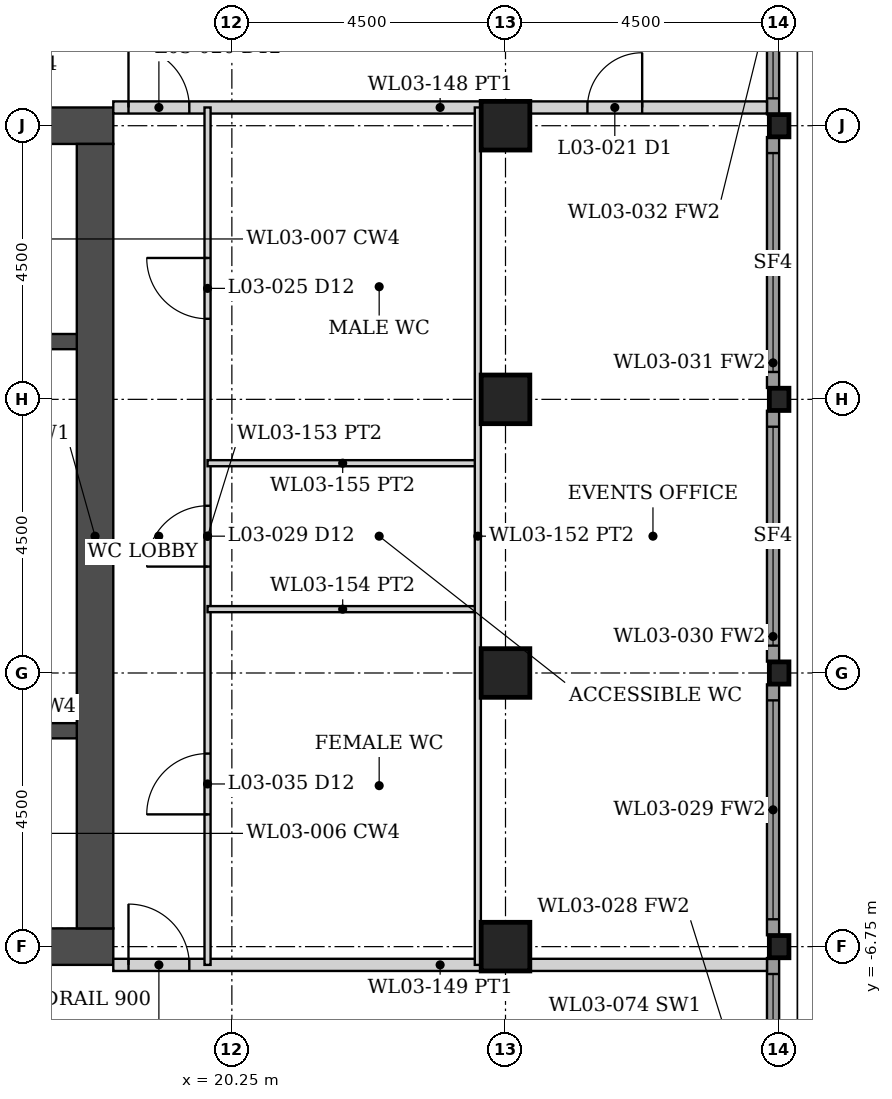
"""IFC4 building model, lengths in metres.
Left out: names, types, materials, properties, quantities, classifications, styles, units other than length and angle.
Written with IfcOpenShell. Run it as: python <this file> out.ifc"""

import sys

from ifc_helpers import new_model, si_unit, direction, frame, frame_2d, origin, origin_2d, place, context, subcontext, project, spatial, rectangle, hollow_rectangle, i_section, extrude, element, fill, save


model = new_model("IFC4")
c1 = context("Model", 3, precision=1e-05, world=origin(), true_north=direction((0.0, 1.0)))
c2 = subcontext(c1, "Body", "Model", "MODEL_VIEW")
j1 = project(units=[si_unit("LENGTHUNIT", "METRE"), si_unit("PLANEANGLEUNIT", "RADIAN")], contexts=[c1])
p1 = place(None, origin())
s1 = spatial("IfcSite", under=j1, at=p1, CompositionType="ELEMENT")
p2 = place(p1, origin())
s2 = spatial("IfcBuilding", under=s1, at=p2, CompositionType="ELEMENT")
p3 = place(p2, frame((0.0, 0.0, 16.0)))
s3 = spatial("IfcBuildingStorey", under=s2, at=p3, CompositionType="ELEMENT", Elevation=16.0)
for number, where, z_axis, x_axis in (
    (1, (24.75, -6.75, 0.0), (0.0, 0.0, 1.0), (1.0, 0.0, 0.0)),
    (2, (24.75, -2.25, 0.0), (0.0, 0.0, 1.0), (1.0, 0.0, 0.0)),
    (3, (24.75, 2.25, 0.0), (0.0, 0.0, 1.0), (1.0, 0.0, 0.0)),
    (4, (24.75, 6.75, 0.0), (0.0, 0.0, 1.0), (1.0, 0.0, 0.0)),
):
    element("IfcColumn", number, at=place(p3, frame(where, z_axis=z_axis, x_axis=x_axis)), inside=s3, PredefinedType="COLUMN", context=c2, shape_type="SweptSolid", body=[
        extrude(hollow_rectangle(XDim=0.8, YDim=0.8, WallThickness=0.08, at=origin_2d()), origin(), (0.0, 0.0, 1.0), 5.5),
    ])
for number, where, z_axis, x_axis in (
    (5, (29.25, -6.75, 0.0), (0.0, 0.0, 1.0), (1.0, 0.0, 0.0)),
    (6, (29.25, -2.25, 0.0), (0.0, 0.0, 1.0), (1.0, 0.0, 0.0)),
    (7, (29.25, 2.25, 0.0), (0.0, 0.0, 1.0), (1.0, 0.0, 0.0)),
    (8, (29.25, 6.75, 0.0), (0.0, 0.0, 1.0), (1.0, 0.0, 0.0)),
):
    element("IfcColumn", number, at=place(p3, frame(where, z_axis=z_axis, x_axis=x_axis)), inside=s3, PredefinedType="COLUMN", context=c2, shape_type="SweptSolid", body=[
        extrude(i_section(OverallWidth=0.322, OverallDepth=0.365, WebThickness=0.027, FlangeThickness=0.044, FilletRadius=0.015, at=origin_2d()), origin(), (0.0, 0.0, 1.0), 5.5),
    ])
for number, where, z_axis, x_axis in (
    (9, (8.7, -6.75, 0.0), (0.0, 0.0, 1.0), (1.0, 0.0, 0.0)),
    (10, (8.7, 6.75, 0.0), (0.0, 0.0, 1.0), (1.0, 0.0, 0.0)),
):
    element("IfcWall", number, at=place(p3, frame(where, z_axis=z_axis, x_axis=x_axis)), inside=s3, PredefinedType="SHEAR", context=c2, shape_type="SweptSolid", body=[
        extrude(rectangle(XDim=9.6, YDim=0.6, at=frame_2d((4.8, 0.0))), origin(), (0.0, 0.0, 1.0), 5.5),
    ])
p4 = place(p3, frame((18.0, -6.45, 0.0), z_axis=(0.0, 0.0, 1.0), x_axis=(0.0, 1.0, 0.0)))
e11 = element("IfcWall", 11, at=p4, inside=s3, PredefinedType="SHEAR", context=c2, shape_type="SweptSolid", body=[
    extrude(rectangle(XDim=12.9, YDim=0.6, at=frame_2d((6.45, 0.0))), origin(), (0.0, 0.0, 1.0), 5.5),
])
p5 = place(p3, frame((9.3, -3.2, 0.0), z_axis=(0.0, 0.0, 1.0), x_axis=(1.0, 0.0, 0.0)))
e12 = element("IfcWall", 12, at=p5, inside=s3, PredefinedType="SHEAR", context=c2, shape_type="SweptSolid", body=[
    extrude(rectangle(XDim=8.4, YDim=0.25, at=frame_2d((4.2, 0.0))), origin(), (0.0, 0.0, 1.0), 5.5),
])
p6 = place(p5, frame((0.15, 0.0, 0.0)))
e13 = element("IfcOpeningElement", 13, at=p6, cuts=e12, PredefinedType="OPENING", context=c2, shape_type="SweptSolid", body=[
    extrude(rectangle(XDim=1.0, YDim=2.1, at=frame_2d((0.5, 1.05))), frame((0.0, 0.135, 0.0), z_axis=(0.0, -1.0, 0.0), x_axis=(1.0, 0.0, 0.0)), (0.0, 0.0, 1.0), 0.27),
])
p7 = place(p3, frame((9.3, 3.2, 0.0), z_axis=(0.0, 0.0, 1.0), x_axis=(1.0, 0.0, 0.0)))
e14 = element("IfcWall", 14, at=p7, inside=s3, PredefinedType="SHEAR", context=c2, shape_type="SweptSolid", body=[
    extrude(rectangle(XDim=8.4, YDim=0.25, at=frame_2d((4.2, 0.0))), origin(), (0.0, 0.0, 1.0), 5.5),
])
p8 = place(p3, frame((29.15, -11.062, 0.0), z_axis=(0.0, 0.0, 1.0), x_axis=(0.0, 1.0, 0.0)))
e15 = element("IfcWall", 15, at=p8, inside=s3, PredefinedType="SOLIDWALL", context=c2, shape_type="SweptSolid", body=[
    extrude(rectangle(XDim=4.125, YDim=0.2, at=frame_2d((2.062, 0.0))), origin(), (0.0, 0.0, 1.0), 4.633),
])
p9 = place(p8, frame((0.262, 0.0, 0.15)))
e16 = element("IfcOpeningElement", 16, at=p9, cuts=e15, PredefinedType="OPENING", context=c2, shape_type="SweptSolid", body=[
    extrude(rectangle(XDim=3.6, YDim=4.333, at=frame_2d((1.8, 2.167))), frame((0.0, 0.11, 0.0), z_axis=(0.0, -1.0, 0.0), x_axis=(1.0, 0.0, 0.0)), (0.0, 0.0, 1.0), 0.22),
])
p10 = place(p3, frame((29.15, -6.562, 0.0), z_axis=(0.0, 0.0, 1.0), x_axis=(0.0, 1.0, 0.0)))
e17 = element("IfcWall", 17, at=p10, inside=s3, PredefinedType="SOLIDWALL", context=c2, shape_type="SweptSolid", body=[
    extrude(rectangle(XDim=4.125, YDim=0.2, at=frame_2d((2.062, 0.0))), origin(), (0.0, 0.0, 1.0), 4.633),
])
p11 = place(p10, frame((0.262, 0.0, 0.15)))
e18 = element("IfcOpeningElement", 18, at=p11, cuts=e17, PredefinedType="OPENING", context=c2, shape_type="SweptSolid", body=[
    extrude(rectangle(XDim=3.6, YDim=4.333, at=frame_2d((1.8, 2.167))), frame((0.0, 0.11, 0.0), z_axis=(0.0, -1.0, 0.0), x_axis=(1.0, 0.0, 0.0)), (0.0, 0.0, 1.0), 0.22),
])
p12 = place(p3, frame((29.15, -2.062, 0.0), z_axis=(0.0, 0.0, 1.0), x_axis=(0.0, 1.0, 0.0)))
e19 = element("IfcWall", 19, at=p12, inside=s3, PredefinedType="SOLIDWALL", context=c2, shape_type="SweptSolid", body=[
    extrude(rectangle(XDim=4.125, YDim=0.2, at=frame_2d((2.062, 0.0))), origin(), (0.0, 0.0, 1.0), 4.633),
])
p13 = place(p12, frame((0.262, 0.0, 0.15)))
e20 = element("IfcOpeningElement", 20, at=p13, cuts=e19, PredefinedType="OPENING", context=c2, shape_type="SweptSolid", body=[
    extrude(rectangle(XDim=3.6, YDim=4.333, at=frame_2d((1.8, 2.167))), frame((0.0, 0.11, 0.0), z_axis=(0.0, -1.0, 0.0), x_axis=(1.0, 0.0, 0.0)), (0.0, 0.0, 1.0), 0.22),
])
p14 = place(p3, frame((29.15, 2.438, 0.0), z_axis=(0.0, 0.0, 1.0), x_axis=(0.0, 1.0, 0.0)))
e21 = element("IfcWall", 21, at=p14, inside=s3, PredefinedType="SOLIDWALL", context=c2, shape_type="SweptSolid", body=[
    extrude(rectangle(XDim=4.125, YDim=0.2, at=frame_2d((2.062, 0.0))), origin(), (0.0, 0.0, 1.0), 4.633),
])
p15 = place(p14, frame((0.262, 0.0, 0.15)))
e22 = element("IfcOpeningElement", 22, at=p15, cuts=e21, PredefinedType="OPENING", context=c2, shape_type="SweptSolid", body=[
    extrude(rectangle(XDim=3.6, YDim=4.333, at=frame_2d((1.8, 2.167))), frame((0.0, 0.11, 0.0), z_axis=(0.0, -1.0, 0.0), x_axis=(1.0, 0.0, 0.0)), (0.0, 0.0, 1.0), 0.22),
])
p16 = place(p3, frame((29.15, 6.938, 0.0), z_axis=(0.0, 0.0, 1.0), x_axis=(0.0, 1.0, 0.0)))
e23 = element("IfcWall", 23, at=p16, inside=s3, PredefinedType="SOLIDWALL", context=c2, shape_type="SweptSolid", body=[
    extrude(rectangle(XDim=4.125, YDim=0.2, at=frame_2d((2.062, 0.0))), origin(), (0.0, 0.0, 1.0), 4.633),
])
p17 = place(p16, frame((0.262, 0.0, 0.15)))
e24 = element("IfcOpeningElement", 24, at=p17, cuts=e23, PredefinedType="OPENING", context=c2, shape_type="SweptSolid", body=[
    extrude(rectangle(XDim=3.6, YDim=4.333, at=frame_2d((1.8, 2.167))), frame((0.0, 0.11, 0.0), z_axis=(0.0, -1.0, 0.0), x_axis=(1.0, 0.0, 0.0)), (0.0, 0.0, 1.0), 0.22),
])
p18 = place(p3, frame((18.3, 7.05, 0.0), z_axis=(0.0, 0.0, 1.0), x_axis=(1.0, 0.0, 0.0)))
e25 = element("IfcWall", 25, at=p18, inside=s3, PredefinedType="PARTITIONING", context=c2, shape_type="SweptSolid", body=[
    extrude(rectangle(XDim=10.75, YDim=0.2, at=frame_2d((5.375, 0.0))), origin(), (0.0, 0.0, 1.0), 4.329),
])
p19 = place(p18, frame((7.798, 0.0, 0.0)))
e26 = element("IfcOpeningElement", 26, at=p19, cuts=e25, PredefinedType="OPENING", context=c2, shape_type="SweptSolid", body=[
    extrude(rectangle(XDim=0.9, YDim=2.1, at=frame_2d((0.45, 1.05))), frame((0.0, 0.11, 0.0), z_axis=(0.0, -1.0, 0.0), x_axis=(1.0, 0.0, 0.0)), (0.0, 0.0, 1.0), 0.22),
])
p20 = place(p18, frame((0.25, 0.0, 0.0)))
e27 = element("IfcOpeningElement", 27, at=p20, cuts=e25, PredefinedType="OPENING", context=c2, shape_type="SweptSolid", body=[
    extrude(rectangle(XDim=1.0, YDim=2.1, at=frame_2d((0.5, 1.05))), frame((0.0, 0.11, 0.0), z_axis=(0.0, -1.0, 0.0), x_axis=(1.0, 0.0, 0.0)), (0.0, 0.0, 1.0), 0.22),
])
p21 = place(p3, frame((18.3, -7.05, 0.0), z_axis=(0.0, 0.0, 1.0), x_axis=(1.0, 0.0, 0.0)))
e28 = element("IfcWall", 28, at=p21, inside=s3, PredefinedType="PARTITIONING", context=c2, shape_type="SweptSolid", body=[
    extrude(rectangle(XDim=10.75, YDim=0.2, at=frame_2d((5.375, 0.0))), origin(), (0.0, 0.0, 1.0), 4.329),
])
p22 = place(p21, frame((0.25, 0.0, 0.0)))
e29 = element("IfcOpeningElement", 29, at=p22, cuts=e28, PredefinedType="OPENING", context=c2, shape_type="SweptSolid", body=[
    extrude(rectangle(XDim=1.0, YDim=2.1, at=frame_2d((0.5, 1.05))), frame((0.0, 0.11, 0.0), z_axis=(0.0, -1.0, 0.0), x_axis=(1.0, 0.0, 0.0)), (0.0, 0.0, 1.0), 0.22),
])
p23 = place(p3, frame((19.85, -7.05, 0.0), z_axis=(0.0, 0.0, 1.0), x_axis=(0.0, 1.0, 0.0)))
e30 = element("IfcWall", 30, at=p23, inside=s3, PredefinedType="PARTITIONING", context=c2, shape_type="SweptSolid", body=[
    extrude(rectangle(XDim=14.1, YDim=0.1, at=frame_2d((7.05, 0.0))), origin(), (0.0, 0.0, 1.0), 4.329),
])
p24 = place(p23, frame((2.475, 0.0, 0.0)))
e31 = element("IfcOpeningElement", 31, at=p24, cuts=e30, PredefinedType="OPENING", context=c2, shape_type="SweptSolid", body=[
    extrude(rectangle(XDim=1.0, YDim=2.1, at=frame_2d((0.5, 1.05))), frame((0.0, 0.06, 0.0), z_axis=(0.0, -1.0, 0.0), x_axis=(1.0, 0.0, 0.0)), (0.0, 0.0, 1.0), 0.12),
])
p25 = place(p23, frame((6.55, 0.0, 0.0)))
e32 = element("IfcOpeningElement", 32, at=p25, cuts=e30, PredefinedType="OPENING", context=c2, shape_type="SweptSolid", body=[
    extrude(rectangle(XDim=1.0, YDim=2.1, at=frame_2d((0.5, 1.05))), frame((0.0, 0.06, 0.0), z_axis=(0.0, -1.0, 0.0), x_axis=(1.0, 0.0, 0.0)), (0.0, 0.0, 1.0), 0.12),
])
p26 = place(p23, frame((10.625, 0.0, 0.0)))
e33 = element("IfcOpeningElement", 33, at=p26, cuts=e30, PredefinedType="OPENING", context=c2, shape_type="SweptSolid", body=[
    extrude(rectangle(XDim=1.0, YDim=2.1, at=frame_2d((0.5, 1.05))), frame((0.0, 0.06, 0.0), z_axis=(0.0, -1.0, 0.0), x_axis=(1.0, 0.0, 0.0)), (0.0, 0.0, 1.0), 0.12),
])
for number, where, z_axis, x_axis in (
    (34, (19.85, -1.2, 0.0), (0.0, 0.0, 1.0), (1.0, 0.0, 0.0)),
    (35, (19.85, 1.2, 0.0), (0.0, 0.0, 1.0), (1.0, 0.0, 0.0)),
):
    element("IfcWall", number, at=place(p3, frame(where, z_axis=z_axis, x_axis=x_axis)), inside=s3, PredefinedType="PARTITIONING", context=c2, shape_type="SweptSolid", body=[
        extrude(rectangle(XDim=4.445, YDim=0.1, at=frame_2d((2.222, 0.0))), origin(), (0.0, 0.0, 1.0), 4.329),
    ])
p27 = place(p3, frame((24.295, -7.05, 0.0), z_axis=(0.0, 0.0, 1.0), x_axis=(0.0, 1.0, 0.0)))
e36 = element("IfcWall", 36, at=p27, inside=s3, PredefinedType="PARTITIONING", context=c2, shape_type="SweptSolid", body=[
    extrude(rectangle(XDim=14.1, YDim=0.1, at=frame_2d((7.05, 0.0))), origin(), (0.0, 0.0, 1.0), 4.329),
])
p28 = place(p9, origin())
e37 = element("IfcWindow", 37, at=p28, inside=s3, PartitioningType="SINGLE_PANEL", PredefinedType="WINDOW", context=c2, shape_type="SweptSolid", body=[
    extrude(rectangle(XDim=3.6, YDim=4.333, at=frame_2d((1.8, 2.167))), frame((0.0, 0.03, 0.0), z_axis=(0.0, -1.0, 0.0), x_axis=(1.0, 0.0, 0.0)), (0.0, 0.0, 1.0), 0.06),
])
fill(e16, e37)
p29 = place(p11, origin())
e38 = element("IfcWindow", 38, at=p29, inside=s3, PartitioningType="SINGLE_PANEL", PredefinedType="WINDOW", context=c2, shape_type="SweptSolid", body=[
    extrude(rectangle(XDim=3.6, YDim=4.333, at=frame_2d((1.8, 2.167))), frame((0.0, 0.03, 0.0), z_axis=(0.0, -1.0, 0.0), x_axis=(1.0, 0.0, 0.0)), (0.0, 0.0, 1.0), 0.06),
])
fill(e18, e38)
p30 = place(p13, origin())
e39 = element("IfcWindow", 39, at=p30, inside=s3, PartitioningType="SINGLE_PANEL", PredefinedType="WINDOW", context=c2, shape_type="SweptSolid", body=[
    extrude(rectangle(XDim=3.6, YDim=4.333, at=frame_2d((1.8, 2.167))), frame((0.0, 0.03, 0.0), z_axis=(0.0, -1.0, 0.0), x_axis=(1.0, 0.0, 0.0)), (0.0, 0.0, 1.0), 0.06),
])
fill(e20, e39)
p31 = place(p15, origin())
e40 = element("IfcWindow", 40, at=p31, inside=s3, PartitioningType="SINGLE_PANEL", PredefinedType="WINDOW", context=c2, shape_type="SweptSolid", body=[
    extrude(rectangle(XDim=3.6, YDim=4.333, at=frame_2d((1.8, 2.167))), frame((0.0, 0.03, 0.0), z_axis=(0.0, -1.0, 0.0), x_axis=(1.0, 0.0, 0.0)), (0.0, 0.0, 1.0), 0.06),
])
fill(e22, e40)
p32 = place(p17, origin())
e41 = element("IfcWindow", 41, at=p32, inside=s3, PartitioningType="SINGLE_PANEL", PredefinedType="WINDOW", context=c2, shape_type="SweptSolid", body=[
    extrude(rectangle(XDim=3.6, YDim=4.333, at=frame_2d((1.8, 2.167))), frame((0.0, 0.03, 0.0), z_axis=(0.0, -1.0, 0.0), x_axis=(1.0, 0.0, 0.0)), (0.0, 0.0, 1.0), 0.06),
])
fill(e24, e41)
p33 = place(p24, origin())
e42 = element("IfcDoor", 42, at=p33, inside=s3, OperationType="SINGLE_SWING_LEFT", PredefinedType="DOOR", context=c2, shape_type="SweptSolid", body=[
    extrude(rectangle(XDim=1.0, YDim=2.1, at=frame_2d((0.5, 1.05))), frame((0.0, 0.025, 0.0), z_axis=(0.0, -1.0, 0.0), x_axis=(1.0, 0.0, 0.0)), (0.0, 0.0, 1.0), 0.05),
])
fill(e31, e42)
p34 = place(p25, origin())
e43 = element("IfcDoor", 43, at=p34, inside=s3, OperationType="SINGLE_SWING_LEFT", PredefinedType="DOOR", context=c2, shape_type="SweptSolid", body=[
    extrude(rectangle(XDim=1.0, YDim=2.1, at=frame_2d((0.5, 1.05))), frame((0.0, 0.025, 0.0), z_axis=(0.0, -1.0, 0.0), x_axis=(1.0, 0.0, 0.0)), (0.0, 0.0, 1.0), 0.05),
])
fill(e32, e43)
p35 = place(p26, origin())
e44 = element("IfcDoor", 44, at=p35, inside=s3, OperationType="SINGLE_SWING_RIGHT", PredefinedType="DOOR", context=c2, shape_type="SweptSolid", body=[
    extrude(rectangle(XDim=1.0, YDim=2.1, at=frame_2d((0.5, 1.05))), frame((0.0, 0.025, 0.0), z_axis=(0.0, -1.0, 0.0), x_axis=(1.0, 0.0, 0.0)), (0.0, 0.0, 1.0), 0.05),
])
fill(e33, e44)
p36 = place(p19, origin())
e45 = element("IfcDoor", 45, at=p36, inside=s3, OperationType="SINGLE_SWING_RIGHT", PredefinedType="DOOR", context=c2, shape_type="SweptSolid", body=[
    extrude(rectangle(XDim=0.9, YDim=2.1, at=frame_2d((0.45, 1.05))), frame((0.0, 0.025, 0.0), z_axis=(0.0, -1.0, 0.0), x_axis=(1.0, 0.0, 0.0)), (0.0, 0.0, 1.0), 0.05),
])
fill(e26, e45)
p37 = place(p20, origin())
e46 = element("IfcDoor", 46, at=p37, inside=s3, OperationType="SINGLE_SWING_LEFT", PredefinedType="DOOR", context=c2, shape_type="SweptSolid", body=[
    extrude(rectangle(XDim=1.0, YDim=2.1, at=frame_2d((0.5, 1.05))), frame((0.0, 0.025, 0.0), z_axis=(0.0, -1.0, 0.0), x_axis=(1.0, 0.0, 0.0)), (0.0, 0.0, 1.0), 0.05),
])
fill(e27, e46)
p38 = place(p22, origin())
e47 = element("IfcDoor", 47, at=p38, inside=s3, OperationType="SINGLE_SWING_LEFT", PredefinedType="DOOR", context=c2, shape_type="SweptSolid", body=[
    extrude(rectangle(XDim=1.0, YDim=2.1, at=frame_2d((0.5, 1.05))), frame((0.0, 0.025, 0.0), z_axis=(0.0, -1.0, 0.0), x_axis=(1.0, 0.0, 0.0)), (0.0, 0.0, 1.0), 0.05),
])
fill(e29, e47)
save(model, sys.argv[1])
